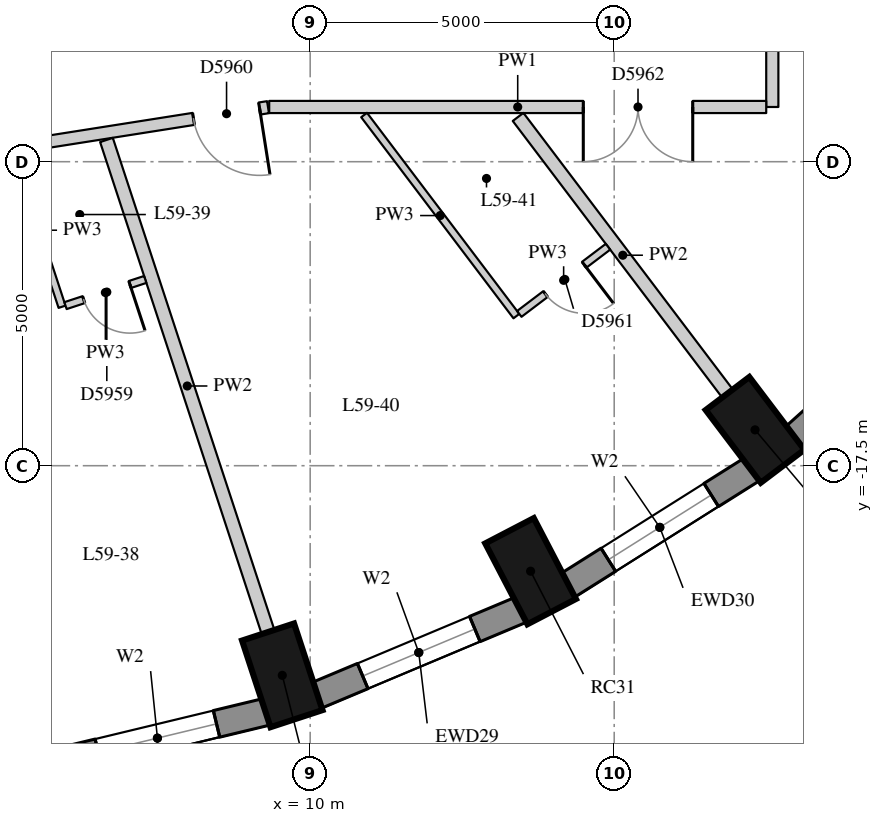
"""IFC4 building model, lengths in metres.
Left out: names, types, materials, properties, quantities, classifications, styles, units other than length and angle.
Written with IfcOpenShell. Run it as: python <this file> out.ifc"""

import sys

from ifc_helpers import new_model, si_unit, direction, frame, frame_2d, origin, origin_2d, place, context, subcontext, project, spatial, rectangle, extrude, element, fill, save


model = new_model("IFC4")
c1 = context("Model", 3, precision=1e-05, world=origin(), true_north=direction((0.0, 1.0)))
c2 = subcontext(c1, "Body", "Model", "MODEL_VIEW")
j1 = project(units=[si_unit("LENGTHUNIT", "METRE"), si_unit("PLANEANGLEUNIT", "RADIAN")], contexts=[c1])
p1 = place(None, origin())
s1 = spatial("IfcSite", under=j1, at=p1, CompositionType="ELEMENT")
p2 = place(p1, origin())
s2 = spatial("IfcBuilding", under=s1, at=p2, CompositionType="ELEMENT")
p3 = place(p2, frame((0.0, 0.0, 209.0)))
s3 = spatial("IfcBuildingStorey", under=s2, at=p3, CompositionType="ELEMENT", Elevation=209.0)
for number, where, z_axis, x_axis in (
    (1, (9.541, -20.948, 0.0), (0.0, 0.0, 1.0), (0.312, -0.95, 0.0)),
    (2, (13.625, -19.235, 0.0), (0.0, 0.0, 1.0), (0.462, -0.887, 0.0)),
    (3, (17.316, -16.911, 0.0), (0.0, 0.0, 1.0), (0.604, -0.797, 0.0)),
):
    element("IfcColumn", number, at=place(p3, frame(where, z_axis=z_axis, x_axis=x_axis)), inside=s3, PredefinedType="COLUMN", context=c2, shape_type="SweptSolid", body=[
        extrude(rectangle(XDim=1.5, YDim=0.9, at=origin_2d()), origin(), (0.0, 0.0, 1.0), 3.3),
    ])
p4 = place(p3, frame((5.691, -22.414, 0.0), z_axis=(0.0, 0.0, 1.0), x_axis=(0.9721584944, 0.234324266275, 0.0)))
e4 = element("IfcWall", 4, at=p4, inside=s3, PredefinedType="SOLIDWALL", context=c2, shape_type="SweptSolid", body=[
    extrude(rectangle(XDim=3.698, YDim=0.45, at=frame_2d((1.849, 0.0))), origin(), (0.0, 0.0, 1.0), 3.02),
])
p5 = place(p4, frame((0.849, 0.0, 0.4)))
e5 = element("IfcOpeningElement", 5, at=p5, cuts=e4, PredefinedType="OPENING", context=c2, shape_type="SweptSolid", body=[
    extrude(rectangle(XDim=2.0, YDim=1.75, at=frame_2d((1.0, 0.875))), frame((0.0, 0.235, 0.0), z_axis=(0.0, -1.0, 0.0), x_axis=(1.0, 0.0, 0.0)), (0.0, 0.0, 1.0), 0.47),
])
p6 = place(p3, frame((10.103, -21.279, 0.0), z_axis=(0.0, 0.0, 1.0), x_axis=(0.922168222612, 0.386789050006, 0.0)))
e6 = element("IfcWall", 6, at=p6, inside=s3, PredefinedType="SOLIDWALL", context=c2, shape_type="SweptSolid", body=[
    extrude(rectangle(XDim=3.651, YDim=0.45, at=frame_2d((1.825, 0.0))), origin(), (0.0, 0.0, 1.0), 3.02),
])
p7 = place(p6, frame((0.825, 0.0, 0.4)))
e7 = element("IfcOpeningElement", 7, at=p7, cuts=e6, PredefinedType="OPENING", context=c2, shape_type="SweptSolid", body=[
    extrude(rectangle(XDim=2.0, YDim=1.75, at=frame_2d((1.0, 0.875))), frame((0.0, 0.235, 0.0), z_axis=(0.0, -1.0, 0.0), x_axis=(1.0, 0.0, 0.0)), (0.0, 0.0, 1.0), 0.47),
])
p8 = place(p3, frame((14.232, -19.47, 0.0), z_axis=(0.0, 0.0, 1.0), x_axis=(0.84614984472, 0.532945063098, 0.0)))
e8 = element("IfcWall", 8, at=p8, inside=s3, PredefinedType="SOLIDWALL", context=c2, shape_type="SweptSolid", body=[
    extrude(rectangle(XDim=3.586, YDim=0.45, at=frame_2d((1.793, 0.0))), origin(), (0.0, 0.0, 1.0), 3.02),
])
p9 = place(p8, frame((0.793, 0.0, 0.4)))
e9 = element("IfcOpeningElement", 9, at=p9, cuts=e8, PredefinedType="OPENING", context=c2, shape_type="SweptSolid", body=[
    extrude(rectangle(XDim=2.0, YDim=1.75, at=frame_2d((1.0, 0.875))), frame((0.0, 0.235, 0.0), z_axis=(0.0, -1.0, 0.0), x_axis=(1.0, 0.0, 0.0)), (0.0, 0.0, 1.0), 0.47),
])
p10 = place(p3, frame((17.953, -17.04, 0.0), z_axis=(0.0, 0.0, 1.0), x_axis=(0.743442727602, 0.668799604348, 0.0)))
e10 = element("IfcWall", 10, at=p10, inside=s3, PredefinedType="SOLIDWALL", context=c2, shape_type="SweptSolid", body=[
    extrude(rectangle(XDim=3.513, YDim=0.45, at=frame_2d((1.756, 0.0))), origin(), (0.0, 0.0, 1.0), 3.02),
])
p11 = place(p3, frame((17.6, -3.8, 0.0), z_axis=(0.0, 0.0, 1.0), x_axis=(0.0, -1.0, 0.0)))
e11 = element("IfcWall", 11, at=p11, inside=s3, PredefinedType="PARTITIONING", context=c2, shape_type="SweptSolid", body=[
    extrude(rectangle(XDim=7.8, YDim=0.2, at=frame_2d((3.9, 0.0))), origin(), (0.0, 0.0, 1.0), 3.02),
])
p12 = place(p3, frame((17.5, -11.6, 0.0), z_axis=(0.0, 0.0, 1.0), x_axis=(-1.0, 0.0, 0.0)))
e12 = element("IfcWall", 12, at=p12, inside=s3, PredefinedType="PARTITIONING", context=c2, shape_type="SweptSolid", body=[
    extrude(rectangle(XDim=8.174, YDim=0.2, at=frame_2d((4.087, 0.0))), origin(), (0.0, 0.0, 1.0), 3.02),
])
p13 = place(p12, frame((1.208, 0.0, 0.0)))
e13 = element("IfcOpeningElement", 13, at=p13, cuts=e12, PredefinedType="OPENING", context=c2, shape_type="SweptSolid", body=[
    extrude(rectangle(XDim=1.8, YDim=2.1, at=frame_2d((0.9, 1.05))), frame((0.0, 0.11, 0.0), z_axis=(0.0, -1.0, 0.0), x_axis=(1.0, 0.0, 0.0)), (0.0, 0.0, 1.0), 0.22),
])
p14 = place(p3, frame((9.306, -11.603, 0.0), z_axis=(0.0, 0.0, 1.0), x_axis=(-0.987842562114, -0.155457622769, 0.0)))
e14 = element("IfcWall", 14, at=p14, inside=s3, PredefinedType="PARTITIONING", context=c2, shape_type="SweptSolid", body=[
    extrude(rectangle(XDim=11.893, YDim=0.2, at=frame_2d((5.947, 0.0))), origin(), (0.0, 0.0, 1.0), 3.02),
])
p15 = place(p14, frame((10.607, 0.0, 0.0)))
e15 = element("IfcOpeningElement", 15, at=p15, cuts=e14, PredefinedType="OPENING", context=c2, shape_type="SweptSolid", body=[
    extrude(rectangle(XDim=0.9, YDim=2.1, at=frame_2d((0.45, 1.05))), frame((0.0, 0.11, 0.0), z_axis=(0.0, -1.0, 0.0), x_axis=(1.0, 0.0, 0.0)), (0.0, 0.0, 1.0), 0.22),
])
p16 = place(p14, frame((5.829, 0.0, 0.0)))
e16 = element("IfcOpeningElement", 16, at=p16, cuts=e14, PredefinedType="OPENING", context=c2, shape_type="SweptSolid", body=[
    extrude(rectangle(XDim=0.9, YDim=2.1, at=frame_2d((0.45, 1.05))), frame((0.0, 0.11, 0.0), z_axis=(0.0, -1.0, 0.0), x_axis=(1.0, 0.0, 0.0)), (0.0, 0.0, 1.0), 0.22),
])
p17 = place(p14, frame((4.669, 0.0, 0.0)))
e17 = element("IfcOpeningElement", 17, at=p17, cuts=e14, PredefinedType="OPENING", context=c2, shape_type="SweptSolid", body=[
    extrude(rectangle(XDim=0.9, YDim=2.1, at=frame_2d((0.45, 1.05))), frame((0.0, 0.11, 0.0), z_axis=(0.0, -1.0, 0.0), x_axis=(1.0, 0.0, 0.0)), (0.0, 0.0, 1.0), 0.22),
])
p18 = place(p14, frame((0.14, 0.0, 0.0)))
e18 = element("IfcOpeningElement", 18, at=p18, cuts=e14, PredefinedType="OPENING", context=c2, shape_type="SweptSolid", body=[
    extrude(rectangle(XDim=1.1, YDim=2.1, at=frame_2d((0.55, 1.05))), frame((0.0, 0.11, 0.0), z_axis=(0.0, -1.0, 0.0), x_axis=(1.0, 0.0, 0.0)), (0.0, 0.0, 1.0), 0.22),
])
p19 = place(p3, frame((9.307, -20.235, 0.0), z_axis=(0.0, 0.0, 1.0), x_axis=(-0.311959631661, 0.950095357432, 0.0)))
e19 = element("IfcWall", 19, at=p19, inside=s3, PredefinedType="PARTITIONING", context=c2, shape_type="SweptSolid", body=[
    extrude(rectangle(XDim=8.518, YDim=0.22, at=frame_2d((4.259, 0.0))), origin(), (0.0, 0.0, 1.0), 3.02),
])
p20 = place(p3, frame((16.863, -16.312, 0.0), z_axis=(0.0, 0.0, 1.0), x_axis=(-0.603636051313, 0.797260006243, 0.0)))
e20 = element("IfcWall", 20, at=p20, inside=s3, PredefinedType="PARTITIONING", context=c2, shape_type="SweptSolid", body=[
    extrude(rectangle(XDim=5.706, YDim=0.22, at=frame_2d((2.853, 0.0))), origin(), (0.0, 0.0, 1.0), 3.02),
])
p21 = place(p3, frame((5.092, -12.368, 0.0), z_axis=(0.0, 0.0, 1.0), x_axis=(0.311969203188, -0.95009221461, 0.0)))
e21 = element("IfcWall", 21, at=p21, inside=s3, PredefinedType="PARTITIONING", context=c2, shape_type="SweptSolid", body=[
    extrude(rectangle(XDim=2.651, YDim=0.12, at=frame_2d((1.325, 0.0))), origin(), (0.0, 0.0, 1.0), 3.02),
])
p22 = place(p3, frame((10.887, -11.732, 0.0), z_axis=(0.0, 0.0, 1.0), x_axis=(0.603646932038, -0.797251767913, 0.0)))
e22 = element("IfcWall", 22, at=p22, inside=s3, PredefinedType="PARTITIONING", context=c2, shape_type="SweptSolid", body=[
    extrude(rectangle(XDim=4.149, YDim=0.12, at=frame_2d((2.074, 0.0))), origin(), (0.0, 0.0, 1.0), 3.02),
])
p23 = place(p3, frame((5.976, -14.867, 0.0), z_axis=(0.0, 0.0, 1.0), x_axis=(0.950123887932, 0.311872726573, 0.0)))
e23 = element("IfcWall", 23, at=p23, inside=s3, PredefinedType="PARTITIONING", context=c2, shape_type="SweptSolid", body=[
    extrude(rectangle(XDim=1.38, YDim=0.12, at=frame_2d((0.69, 0.0))), origin(), (0.0, 0.0, 1.0), 3.02),
])
p24 = place(p23, frame((0.315, 0.0, 0.0)))
e24 = element("IfcOpeningElement", 24, at=p24, cuts=e23, PredefinedType="OPENING", context=c2, shape_type="SweptSolid", body=[
    extrude(rectangle(XDim=0.8, YDim=2.1, at=frame_2d((0.4, 1.05))), frame((0.0, 0.07, 0.0), z_axis=(0.0, -1.0, 0.0), x_axis=(1.0, 0.0, 0.0)), (0.0, 0.0, 1.0), 0.14),
])
p25 = place(p3, frame((13.439, -15.003, 0.0), z_axis=(0.0, 0.0, 1.0), x_axis=(0.797238062708, 0.603665032422, 0.0)))
e25 = element("IfcWall", 25, at=p25, inside=s3, PredefinedType="PARTITIONING", context=c2, shape_type="SweptSolid", body=[
    extrude(rectangle(XDim=1.83, YDim=0.12, at=frame_2d((0.915, 0.0))), origin(), (0.0, 0.0, 1.0), 3.02),
])
p26 = place(p25, frame((0.54, 0.0, 0.0)))
e26 = element("IfcOpeningElement", 26, at=p26, cuts=e25, PredefinedType="OPENING", context=c2, shape_type="SweptSolid", body=[
    extrude(rectangle(XDim=0.8, YDim=2.1, at=frame_2d((0.4, 1.05))), frame((0.0, 0.07, 0.0), z_axis=(0.0, -1.0, 0.0), x_axis=(1.0, 0.0, 0.0)), (0.0, 0.0, 1.0), 0.14),
])
p27 = place(p5, origin())
e27 = element("IfcWindow", 27, at=p27, inside=s3, PartitioningType="SINGLE_PANEL", PredefinedType="WINDOW", context=c2, shape_type="SweptSolid", body=[
    extrude(rectangle(XDim=2.0, YDim=1.75, at=frame_2d((1.0, 0.875))), frame((0.0, 0.035, 0.0), z_axis=(0.0, -1.0, 0.0), x_axis=(1.0, 0.0, 0.0)), (0.0, 0.0, 1.0), 0.06),
])
fill(e5, e27)
p28 = place(p7, origin())
e28 = element("IfcWindow", 28, at=p28, inside=s3, PartitioningType="SINGLE_PANEL", PredefinedType="WINDOW", context=c2, shape_type="SweptSolid", body=[
    extrude(rectangle(XDim=2.0, YDim=1.75, at=frame_2d((1.0, 0.875))), frame((0.0, 0.035, 0.0), z_axis=(0.0, -1.0, 0.0), x_axis=(1.0, 0.0, 0.0)), (0.0, 0.0, 1.0), 0.06),
])
fill(e7, e28)
p29 = place(p9, origin())
e29 = element("IfcWindow", 29, at=p29, inside=s3, PartitioningType="SINGLE_PANEL", PredefinedType="WINDOW", context=c2, shape_type="SweptSolid", body=[
    extrude(rectangle(XDim=2.0, YDim=1.75, at=frame_2d((1.0, 0.875))), frame((0.0, 0.035, 0.0), z_axis=(0.0, -1.0, 0.0), x_axis=(1.0, 0.0, 0.0)), (0.0, 0.0, 1.0), 0.06),
])
fill(e9, e29)
p30 = place(p24, origin())
e30 = element("IfcDoor", 30, at=p30, inside=s3, OperationType="SINGLE_SWING_LEFT", PredefinedType="DOOR", context=c2, shape_type="SweptSolid", body=[
    extrude(rectangle(XDim=0.8, YDim=2.1, at=frame_2d((0.4, 1.05))), frame((0.0, 0.025, 0.0), z_axis=(0.0, -1.0, 0.0), x_axis=(1.0, 0.0, 0.0)), (0.0, 0.0, 1.0), 0.05),
])
fill(e24, e30)
p31 = place(p18, origin())
e31 = element("IfcDoor", 31, at=p31, inside=s3, OperationType="SINGLE_SWING_LEFT", PredefinedType="DOOR", context=c2, shape_type="SweptSolid", body=[
    extrude(rectangle(XDim=1.1, YDim=2.1, at=frame_2d((0.55, 1.05))), frame((0.0, 0.025, 0.0), z_axis=(0.0, -1.0, 0.0), x_axis=(1.0, 0.0, 0.0)), (0.0, 0.0, 1.0), 0.05),
])
fill(e18, e31)
p32 = place(p26, origin())
e32 = element("IfcDoor", 32, at=p32, inside=s3, OperationType="SINGLE_SWING_LEFT", PredefinedType="DOOR", context=c2, shape_type="SweptSolid", body=[
    extrude(rectangle(XDim=0.8, YDim=2.1, at=frame_2d((0.4, 1.05))), frame((0.0, 0.025, 0.0), z_axis=(0.0, -1.0, 0.0), x_axis=(1.0, 0.0, 0.0)), (0.0, 0.0, 1.0), 0.05),
])
fill(e26, e32)
p33 = place(p13, origin())
e33 = element("IfcDoor", 33, at=p33, inside=s3, OperationType="DOUBLE_DOOR_SINGLE_SWING", PredefinedType="DOOR", context=c2, shape_type="SweptSolid", body=[
    extrude(rectangle(XDim=1.8, YDim=2.1, at=frame_2d((0.9, 1.05))), frame((0.0, 0.025, 0.0), z_axis=(0.0, -1.0, 0.0), x_axis=(1.0, 0.0, 0.0)), (0.0, 0.0, 1.0), 0.05),
])
fill(e13, e33)
save(model, sys.argv[1])
